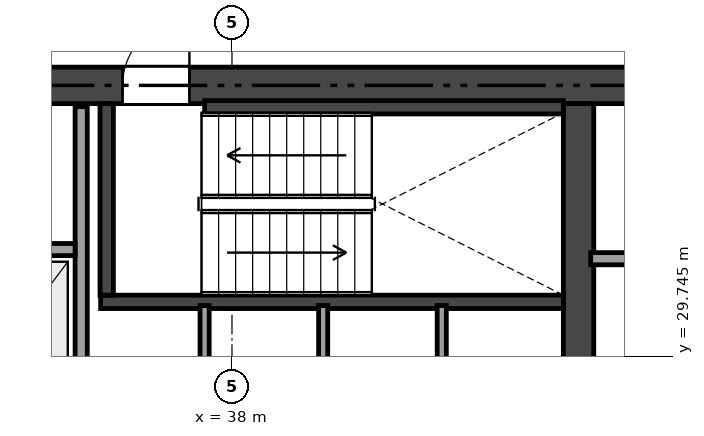
"""IFC4 building model, lengths in metres.
Left out: names, types, materials, properties, quantities, classifications, styles, units other than length and angle.
Written with IfcOpenShell. Run it as: python <this file> out.ifc"""

import sys

from ifc_helpers import new_model, si_unit, direction, frame, frame_2d, origin, place, context, subcontext, project, spatial, rectangle, extrude, element, fill, save


model = new_model("IFC4")
c1 = context("Model", 3, precision=1e-05, world=origin(), true_north=direction((0.0, 1.0)))
c2 = subcontext(c1, "Body", "Model", "MODEL_VIEW")
j1 = project(units=[si_unit("LENGTHUNIT", "METRE"), si_unit("PLANEANGLEUNIT", "RADIAN")], contexts=[c1])
p1 = place(None, origin())
s1 = spatial("IfcSite", under=j1, at=p1, CompositionType="ELEMENT")
p2 = place(p1, origin())
s2 = spatial("IfcBuilding", under=s1, at=p2, CompositionType="ELEMENT")
p3 = place(p2, frame((0.0, 0.0, 129.3)))
s3 = spatial("IfcBuildingStorey", under=s2, at=p3, CompositionType="ELEMENT", Elevation=129.3)
p4 = place(p3, frame((26.5, 34.2, 0.0), z_axis=(0.0, 0.0, 1.0), x_axis=(1.0, 0.0, 0.0)))
e1 = element("IfcWall", 1, at=p4, inside=s3, PredefinedType="SHEAR", context=c2, shape_type="SweptSolid", body=[
    extrude(rectangle(XDim=21.4, YDim=0.6, at=frame_2d((10.7, 0.0))), origin(), (0.0, 0.0, 1.0), 3.32),
])
p5 = place(p4, frame((9.7, 0.0, 0.0)))
e2 = element("IfcOpeningElement", 2, at=p5, cuts=e1, PredefinedType="OPENING", context=c2, shape_type="SweptSolid", body=[
    extrude(rectangle(XDim=1.1, YDim=2.15, at=frame_2d((0.55, 1.075))), frame((0.0, 0.31, 0.0), z_axis=(0.0, -1.0, 0.0), x_axis=(1.0, 0.0, 0.0)), (0.0, 0.0, 1.0), 0.62),
])
p6 = place(p4, frame((1.95, 0.0, 0.0)))
e3 = element("IfcOpeningElement", 3, at=p6, cuts=e1, PredefinedType="OPENING", context=c2, shape_type="SweptSolid", body=[
    extrude(rectangle(XDim=0.9, YDim=2.1, at=frame_2d((0.45, 1.05))), frame((0.0, 0.31, 0.0), z_axis=(0.0, -1.0, 0.0), x_axis=(1.0, 0.0, 0.0)), (0.0, 0.0, 1.0), 0.62),
])
p7 = place(p4, frame((6.25, 0.0, 0.0)))
e4 = element("IfcOpeningElement", 4, at=p7, cuts=e1, PredefinedType="OPENING", context=c2, shape_type="SweptSolid", body=[
    extrude(rectangle(XDim=0.9, YDim=2.1, at=frame_2d((0.45, 1.05))), frame((0.0, 0.31, 0.0), z_axis=(0.0, -1.0, 0.0), x_axis=(1.0, 0.0, 0.0)), (0.0, 0.0, 1.0), 0.62),
])
p8 = place(p3, frame((43.7, 18.9, 0.0), z_axis=(0.0, 0.0, 1.0), x_axis=(0.0, 1.0, 0.0)))
e5 = element("IfcWall", 5, at=p8, inside=s3, PredefinedType="SHEAR", context=c2, shape_type="SweptSolid", body=[
    extrude(rectangle(XDim=15.0, YDim=0.5, at=frame_2d((7.5, 0.0))), origin(), (0.0, 0.0, 1.0), 3.32),
])
p9 = place(p8, frame((8.1, 0.0, 0.0)))
e6 = element("IfcOpeningElement", 6, at=p9, cuts=e5, PredefinedType="OPENING", context=c2, shape_type="SweptSolid", body=[
    extrude(rectangle(XDim=0.9, YDim=2.1, at=frame_2d((0.45, 1.05))), frame((0.0, 0.26, 0.0), z_axis=(0.0, -1.0, 0.0), x_axis=(1.0, 0.0, 0.0)), (0.0, 0.0, 1.0), 0.52),
])
p10 = place(p3, frame((35.84, 30.64, 0.0), z_axis=(0.0, 0.0, 1.0), x_axis=(1.0, 0.0, 0.0)))
e7 = element("IfcWall", 7, at=p10, inside=s3, PredefinedType="SHEAR", context=c2, shape_type="SweptSolid", body=[
    extrude(rectangle(XDim=7.61, YDim=0.22, at=frame_2d((3.805, 0.0))), origin(), (0.0, 0.0, 1.0), 3.32),
])
p11 = place(p3, frame((35.94, 30.75, 0.0), z_axis=(0.0, 0.0, 1.0), x_axis=(0.0, 1.0, 0.0)))
e8 = element("IfcWall", 8, at=p11, inside=s3, PredefinedType="SHEAR", context=c2, shape_type="SweptSolid", body=[
    extrude(rectangle(XDim=3.15, YDim=0.22, at=frame_2d((1.575, 0.0))), origin(), (0.0, 0.0, 1.0), 3.32),
])
p12 = place(p3, frame((37.55, 33.84, 0.0), z_axis=(0.0, 0.0, 1.0), x_axis=(1.0, 0.0, 0.0)))
e9 = element("IfcWall", 9, at=p12, inside=s3, PredefinedType="SHEAR", context=c2, shape_type="SweptSolid", body=[
    extrude(rectangle(XDim=5.9, YDim=0.22, at=frame_2d((2.95, 0.0))), origin(), (0.0, 0.0, 1.0), 3.32),
])
p13 = place(p3, frame((43.9, 31.35, 0.0), z_axis=(0.0, 0.0, 1.0), x_axis=(1.0, 0.0, 0.0)))
e10 = element("IfcWall", 10, at=p13, inside=s3, PredefinedType="SOLIDWALL", context=c2, shape_type="SweptSolid", body=[
    extrude(rectangle(XDim=3.35, YDim=0.2, at=frame_2d((1.675, 0.0))), origin(), (0.0, 0.0, 1.0), 2.949),
])
p14 = place(p3, frame((35.52, 18.95, 0.0), z_axis=(0.0, 0.0, 1.0), x_axis=(0.0, 1.0, 0.0)))
e11 = element("IfcWall", 11, at=p14, inside=s3, PredefinedType="SOLIDWALL", context=c2, shape_type="SweptSolid", body=[
    extrude(rectangle(XDim=14.9, YDim=0.2, at=frame_2d((7.45, 0.0))), origin(), (0.0, 0.0, 1.0), 2.841),
])
p15 = place(p14, frame((7.755, 0.0, 0.0)))
e12 = element("IfcOpeningElement", 12, at=p15, cuts=e11, PredefinedType="OPENING", context=c2, shape_type="SweptSolid", body=[
    extrude(rectangle(XDim=0.95, YDim=2.15, at=frame_2d((0.475, 1.075))), frame((0.0, 0.11, 0.0), z_axis=(0.0, -1.0, 0.0), x_axis=(1.0, 0.0, 0.0)), (0.0, 0.0, 1.0), 0.22),
])
p16 = place(p14, frame((0.6, 0.0, 0.0)))
e13 = element("IfcOpeningElement", 13, at=p16, cuts=e11, PredefinedType="OPENING", context=c2, shape_type="SweptSolid", body=[
    extrude(rectangle(XDim=0.9, YDim=2.1, at=frame_2d((0.45, 1.05))), frame((0.0, 0.11, 0.0), z_axis=(0.0, -1.0, 0.0), x_axis=(1.0, 0.0, 0.0)), (0.0, 0.0, 1.0), 0.22),
])
p17 = place(p3, frame((31.0, 31.5, 0.0), z_axis=(0.0, 0.0, 1.0), x_axis=(1.0, 0.0, 0.0)))
e14 = element("IfcWall", 14, at=p17, inside=s3, PredefinedType="SOLIDWALL", context=c2, shape_type="SweptSolid", body=[
    extrude(rectangle(XDim=4.42, YDim=0.2, at=frame_2d((2.21, 0.0))), origin(), (0.0, 0.0, 1.0), 3.32),
])
for number, where, z_axis, x_axis in (
    (15, (37.55, 28.15, 0.0), (0.0, 0.0, 1.0), (0.0, 1.0, 0.0)),
    (16, (39.5, 28.15, 0.0), (0.0, 0.0, 1.0), (0.0, 1.0, 0.0)),
    (17, (41.45, 28.15, 0.0), (0.0, 0.0, 1.0), (0.0, 1.0, 0.0)),
):
    element("IfcWall", number, at=place(p3, frame(where, z_axis=z_axis, x_axis=x_axis)), inside=s3, PredefinedType="PARTITIONING", context=c2, shape_type="SweptSolid", body=[
        extrude(rectangle(XDim=2.43, YDim=0.15, at=frame_2d((1.215, 0.0))), origin(), (0.0, 0.0, 1.0), 3.32),
    ])
p18 = place(p5, origin())
e18 = element("IfcDoor", 18, at=p18, inside=s3, OperationType="SINGLE_SWING_RIGHT", PredefinedType="DOOR", context=c2, shape_type="SweptSolid", body=[
    extrude(rectangle(XDim=1.1, YDim=2.15, at=frame_2d((0.55, 1.075))), frame((0.0, 0.025, 0.0), z_axis=(0.0, -1.0, 0.0), x_axis=(1.0, 0.0, 0.0)), (0.0, 0.0, 1.0), 0.05),
])
fill(e2, e18)
save(model, sys.argv[1])
